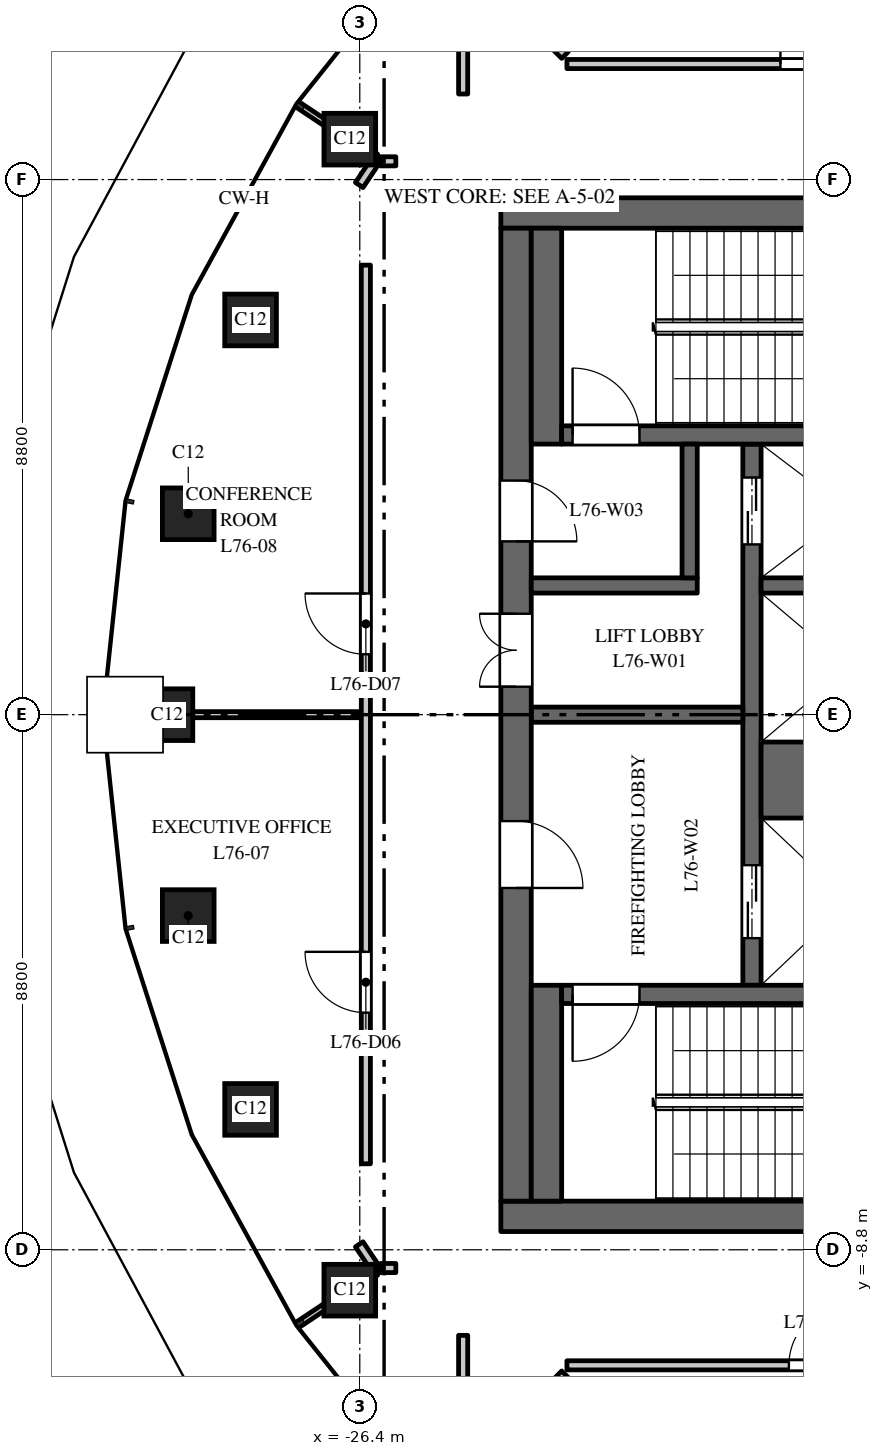
"""IFC4 building model, lengths in metres.
Left out: names, types, materials, properties, quantities, classifications, styles, units other than length and angle.
Written with IfcOpenShell. Run it as: python <this file> out.ifc"""

import sys

from ifc_helpers import new_model, si_unit, direction, frame, frame_2d, origin, origin_2d, place, context, subcontext, project, spatial, rectangle, extrude, element, fill, save


model = new_model("IFC4")
c1 = context("Model", 3, precision=1e-05, world=origin(), true_north=direction((0.0, 1.0)))
c2 = subcontext(c1, "Body", "Model", "MODEL_VIEW")
j1 = project(units=[si_unit("LENGTHUNIT", "METRE"), si_unit("PLANEANGLEUNIT", "RADIAN")], contexts=[c1])
p1 = place(None, origin())
s1 = spatial("IfcSite", under=j1, at=p1, CompositionType="ELEMENT")
p2 = place(p1, origin())
s2 = spatial("IfcBuilding", under=s1, at=p2, CompositionType="ELEMENT")
p3 = place(p2, frame((0.0, 0.0, 347.0)))
s3 = spatial("IfcBuildingStorey", under=s2, at=p3, CompositionType="ELEMENT", Elevation=347.0)
p4 = place(p3, frame((-24.418, 12.154, 0.021), z_axis=(0.450739713419, -0.316171343674, 0.834787034031), x_axis=(0.574258734761, 0.81867387008, 0.0)))
e1 = element("IfcColumn", 1, at=p4, inside=s3, PredefinedType="COLUMN", context=c2, shape_type="SweptSolid", body=[
    extrude(rectangle(XDim=0.85, YDim=0.85, at=origin_2d()), origin(), (0.0, 0.0, 1.0), 4.744),
])
p5 = place(p3, frame((-26.564, 9.464, 0.021), z_axis=(0.491879634407, -0.247568905736, 0.834723943689), x_axis=(0.449578736033, 0.893240706701, 0.0)))
e2 = element("IfcColumn", 2, at=p5, inside=s3, PredefinedType="COLUMN", context=c2, shape_type="SweptSolid", body=[
    extrude(rectangle(XDim=0.85, YDim=0.85, at=origin_2d()), origin(), (0.0, 0.0, 1.0), 4.646),
])
p6 = place(p3, frame((-28.196, 6.491, 0.021), z_axis=(0.523716020233, -0.170699160403, 0.834615676098), x_axis=(0.309892926909, 0.950771462472, 0.0)))
e3 = element("IfcColumn", 3, at=p6, inside=s3, PredefinedType="COLUMN", context=c2, shape_type="SweptSolid", body=[
    extrude(rectangle(XDim=0.85, YDim=0.85, at=origin_2d()), origin(), (0.0, 0.0, 1.0), 4.707),
])
p7 = place(p3, frame((-29.221, 3.304, 0.021), z_axis=(0.544037398936, -0.087235716357, 0.834513773614), x_axis=(0.158326246878, 0.987386854049, 0.0)))
e4 = element("IfcColumn", 4, at=p7, inside=s3, PredefinedType="COLUMN", context=c2, shape_type="SweptSolid", body=[
    extrude(rectangle(XDim=0.85, YDim=0.85, at=origin_2d()), origin(), (0.0, 0.0, 1.0), 4.735),
])
p8 = place(p3, frame((-29.572, 0.0, 0.021), z_axis=(0.551078466919, 0.0, 0.834453427878), x_axis=(0.0, 1.0, 0.0)))
e5 = element("IfcColumn", 5, at=p8, inside=s3, PredefinedType="COLUMN", context=c2, shape_type="SweptSolid", body=[
    extrude(rectangle(XDim=0.85, YDim=0.85, at=origin_2d()), origin(), (0.0, 0.0, 1.0), 4.736),
])
p9 = place(p3, frame((-29.221, -3.304, 0.021), z_axis=(0.544037398936, 0.087235716357, 0.834513773614), x_axis=(-0.158326246878, 0.987386854049, 0.0)))
e6 = element("IfcColumn", 6, at=p9, inside=s3, PredefinedType="COLUMN", context=c2, shape_type="SweptSolid", body=[
    extrude(rectangle(XDim=0.85, YDim=0.85, at=origin_2d()), origin(), (0.0, 0.0, 1.0), 4.735),
])
p10 = place(p3, frame((-28.196, -6.491, 0.021), z_axis=(0.523716020233, 0.170699160403, 0.834615676098), x_axis=(-0.309892926909, 0.950771462472, 0.0)))
e7 = element("IfcColumn", 7, at=p10, inside=s3, PredefinedType="COLUMN", context=c2, shape_type="SweptSolid", body=[
    extrude(rectangle(XDim=0.85, YDim=0.85, at=origin_2d()), origin(), (0.0, 0.0, 1.0), 4.707),
])
p11 = place(p3, frame((-26.564, -9.464, 0.021), z_axis=(0.491879634407, 0.247568905736, 0.834723943689), x_axis=(-0.449578736033, 0.893240706701, 0.0)))
e8 = element("IfcColumn", 8, at=p11, inside=s3, PredefinedType="COLUMN", context=c2, shape_type="SweptSolid", body=[
    extrude(rectangle(XDim=0.85, YDim=0.85, at=origin_2d()), origin(), (0.0, 0.0, 1.0), 4.646),
])
p12 = place(p3, frame((-24.418, -12.154, 0.021), z_axis=(0.450739713419, 0.316171343674, 0.834787034031), x_axis=(-0.574258734761, 0.81867387008, 0.0)))
e9 = element("IfcColumn", 9, at=p12, inside=s3, PredefinedType="COLUMN", context=c2, shape_type="SweptSolid", body=[
    extrude(rectangle(XDim=0.85, YDim=0.85, at=origin_2d()), origin(), (0.0, 0.0, 1.0), 4.744),
])
for number, where, z_axis, x_axis in (
    (10, (-16.5, 8.25, 0.0), (0.0, 0.0, 1.0), (-1.0, 0.0, 0.0)),
    (11, (-16.5, -8.25, 0.0), (0.0, 0.0, 1.0), (-1.0, 0.0, 0.0)),
):
    element("IfcWall", number, at=place(p3, frame(where, z_axis=z_axis, x_axis=x_axis)), inside=s3, PredefinedType="SHEAR", context=c2, shape_type="SweptSolid", body=[
        extrude(rectangle(XDim=7.58, YDim=0.5, at=frame_2d((3.79, 0.0))), origin(), (0.0, 0.0, 1.0), 3.7),
    ])
p13 = place(p3, frame((-19.95, -4.45, 0.0), z_axis=(0.0, 0.0, 1.0), x_axis=(0.0, 1.0, 0.0)))
e12 = element("IfcWall", 12, at=p13, inside=s3, PredefinedType="SHEAR", context=c2, shape_type="SweptSolid", body=[
    extrude(rectangle(XDim=8.9, YDim=0.3, at=frame_2d((4.45, 0.0))), origin(), (0.0, 0.0, 1.0), 3.7),
])
p14 = place(p13, frame((0.775, 0.0, 0.0)))
e13 = element("IfcOpeningElement", 13, at=p14, cuts=e12, PredefinedType="OPENING", context=c2, shape_type="SweptSolid", body=[
    extrude(rectangle(XDim=1.2, YDim=2.1, at=frame_2d((0.6, 1.05))), frame((0.0, 0.16, 0.0), z_axis=(0.0, -1.0, 0.0), x_axis=(1.0, 0.0, 0.0)), (0.0, 0.0, 1.0), 0.32),
])
p15 = place(p13, frame((7.25, 0.0, 0.0)))
e14 = element("IfcOpeningElement", 14, at=p15, cuts=e12, PredefinedType="OPENING", context=c2, shape_type="SweptSolid", body=[
    extrude(rectangle(XDim=1.1, YDim=2.1, at=frame_2d((0.55, 1.05))), frame((0.0, 0.16, 0.0), z_axis=(0.0, -1.0, 0.0), x_axis=(1.0, 0.0, 0.0)), (0.0, 0.0, 1.0), 0.32),
])
p16 = place(p3, frame((-20.1, 0.0, 0.0), z_axis=(0.0, 0.0, 1.0), x_axis=(-1.0, 0.0, 0.0)))
e15 = element("IfcWall", 15, at=p16, inside=s3, PredefinedType="SHEAR", context=c2, shape_type="SweptSolid", body=[
    extrude(rectangle(XDim=3.48, YDim=0.25, at=frame_2d((1.74, 0.0))), origin(), (0.0, 0.0, 1.0), 3.7),
])
p17 = place(p3, frame((-23.83, -8.0, 0.0), z_axis=(0.0, 0.0, 1.0), x_axis=(0.0, 1.0, 0.0)))
e16 = element("IfcWall", 16, at=p17, inside=s3, PredefinedType="SHEAR", context=c2, shape_type="SweptSolid", body=[
    extrude(rectangle(XDim=16.0, YDim=0.5, at=frame_2d((8.0, 0.0))), origin(), (0.0, 0.0, 1.0), 3.7),
])
p18 = place(p17, frame((5.15, 0.0, 0.0)))
e17 = element("IfcOpeningElement", 17, at=p18, cuts=e16, PredefinedType="OPENING", context=c2, shape_type="SweptSolid", body=[
    extrude(rectangle(XDim=1.1, YDim=2.1, at=frame_2d((0.55, 1.05))), frame((0.0, 0.26, 0.0), z_axis=(0.0, -1.0, 0.0), x_axis=(1.0, 0.0, 0.0)), (0.0, 0.0, 1.0), 0.52),
])
p19 = place(p17, frame((10.85, 0.0, 0.0)))
e18 = element("IfcOpeningElement", 18, at=p19, cuts=e16, PredefinedType="OPENING", context=c2, shape_type="SweptSolid", body=[
    extrude(rectangle(XDim=1.0, YDim=2.1, at=frame_2d((0.5, 1.05))), frame((0.0, 0.26, 0.0), z_axis=(0.0, -1.0, 0.0), x_axis=(1.0, 0.0, 0.0)), (0.0, 0.0, 1.0), 0.52),
])
p20 = place(p17, frame((8.46, 0.0, 0.0)))
e19 = element("IfcOpeningElement", 19, at=p20, cuts=e16, PredefinedType="OPENING", context=c2, shape_type="SweptSolid", body=[
    extrude(rectangle(XDim=1.2, YDim=2.1, at=frame_2d((0.6, 1.05))), frame((0.0, 0.26, 0.0), z_axis=(0.0, -1.0, 0.0), x_axis=(1.0, 0.0, 0.0)), (0.0, 0.0, 1.0), 0.52),
])
p21 = place(p3, frame((-16.9, -1.075, 0.0), z_axis=(0.0, 0.0, 1.0), x_axis=(-1.0, 0.0, 0.0)))
e20 = element("IfcWall", 20, at=p21, inside=s3, PredefinedType="SHEAR", context=c2, shape_type="SweptSolid", body=[
    extrude(rectangle(XDim=2.9, YDim=1.25, at=frame_2d((1.45, 0.0))), origin(), (0.0, 0.0, 1.0), 3.7),
])
p22 = place(p3, frame((-16.9, 2.125, 0.0), z_axis=(0.0, 0.0, 1.0), x_axis=(-1.0, 0.0, 0.0)))
e21 = element("IfcWall", 21, at=p22, inside=s3, PredefinedType="SHEAR", context=c2, shape_type="SweptSolid", body=[
    extrude(rectangle(XDim=2.9, YDim=0.25, at=frame_2d((1.45, 0.0))), origin(), (0.0, 0.0, 1.0), 3.7),
])
for number, where, z_axis, x_axis in (
    (22, (-23.33, 4.45, 0.0), (0.0, 0.0, 1.0), (0.0, 1.0, 0.0)),
    (23, (-23.33, -8.0, 0.0), (0.0, 0.0, 1.0), (0.0, 1.0, 0.0)),
):
    element("IfcWall", number, at=place(p3, frame(where, z_axis=z_axis, x_axis=x_axis)), inside=s3, PredefinedType="SHEAR", context=c2, shape_type="SweptSolid", body=[
        extrude(rectangle(XDim=3.55, YDim=0.5, at=frame_2d((1.775, 0.0))), origin(), (0.0, 0.0, 1.0), 3.7),
    ])
p23 = place(p3, frame((-16.9, 4.6, 0.0), z_axis=(0.0, 0.0, 1.0), x_axis=(-1.0, 0.0, 0.0)))
e24 = element("IfcWall", 24, at=p23, inside=s3, PredefinedType="SHEAR", context=c2, shape_type="SweptSolid", body=[
    extrude(rectangle(XDim=6.18, YDim=0.3, at=frame_2d((3.09, 0.0))), origin(), (0.0, 0.0, 1.0), 3.7),
])
p24 = place(p23, frame((4.9, 0.0, 0.0)))
e25 = element("IfcOpeningElement", 25, at=p24, cuts=e24, PredefinedType="OPENING", context=c2, shape_type="SweptSolid", body=[
    extrude(rectangle(XDim=1.1, YDim=2.1, at=frame_2d((0.55, 1.05))), frame((0.0, 0.16, 0.0), z_axis=(0.0, -1.0, 0.0), x_axis=(1.0, 0.0, 0.0)), (0.0, 0.0, 1.0), 0.32),
])
p25 = place(p3, frame((-16.9, -4.6, 0.0), z_axis=(0.0, 0.0, 1.0), x_axis=(-1.0, 0.0, 0.0)))
e26 = element("IfcWall", 26, at=p25, inside=s3, PredefinedType="SHEAR", context=c2, shape_type="SweptSolid", body=[
    extrude(rectangle(XDim=6.18, YDim=0.3, at=frame_2d((3.09, 0.0))), origin(), (0.0, 0.0, 1.0), 3.7),
])
p26 = place(p25, frame((4.9, 0.0, 0.0)))
e27 = element("IfcOpeningElement", 27, at=p26, cuts=e26, PredefinedType="OPENING", context=c2, shape_type="SweptSolid", body=[
    extrude(rectangle(XDim=1.1, YDim=2.1, at=frame_2d((0.55, 1.05))), frame((0.0, 0.16, 0.0), z_axis=(0.0, -1.0, 0.0), x_axis=(1.0, 0.0, 0.0)), (0.0, 0.0, 1.0), 0.32),
])
p27 = place(p3, frame((-20.85, 2.125, 0.0), z_axis=(0.0, 0.0, 1.0), x_axis=(-1.0, 0.0, 0.0)))
e28 = element("IfcWall", 28, at=p27, inside=s3, PredefinedType="SHEAR", context=c2, shape_type="SweptSolid", body=[
    extrude(rectangle(XDim=2.73, YDim=0.25, at=frame_2d((1.365, 0.0))), origin(), (0.0, 0.0, 1.0), 3.7),
])
p28 = place(p3, frame((-20.975, 2.25, 0.0), z_axis=(0.0, 0.0, 1.0), x_axis=(0.0, 1.0, 0.0)))
e29 = element("IfcWall", 29, at=p28, inside=s3, PredefinedType="SHEAR", context=c2, shape_type="SweptSolid", body=[
    extrude(rectangle(XDim=2.2, YDim=0.25, at=frame_2d((1.1, 0.0))), origin(), (0.0, 0.0, 1.0), 3.7),
])
p29 = place(p3, frame((-30.59, 0.0, 0.0), z_axis=(0.0, 0.0, 1.0), x_axis=(1.0, 0.0, 0.0)))
e30 = element("IfcWall", 30, at=p29, inside=s3, PredefinedType="PARTITIONING", context=c2, shape_type="SweptSolid", body=[
    extrude(rectangle(XDim=4.215, YDim=0.1, at=frame_2d((2.107, 0.0))), origin(), (0.0, 0.0, 1.0), 3.0),
])
for number, where, z_axis, x_axis in (
    (31, (-27.412, -10.027, 0.0), (0.0, 0.0, 1.0), (0.832, 0.554, 0.0)),
    (32, (-27.412, 10.027, 0.0), (0.0, 0.0, 1.0), (0.832, -0.554, 0.0)),
):
    element("IfcWall", number, at=place(p3, frame(where, z_axis=z_axis, x_axis=x_axis)), inside=s3, PredefinedType="PARTITIONING", context=c2, shape_type="SweptSolid", body=[
        extrude(rectangle(XDim=1.537, YDim=0.1, at=frame_2d((0.769, 0.0))), origin(), (0.0, 0.0, 1.0), 3.7),
    ])
for number, where, z_axis, x_axis in (
    (33, (-26.409, -8.71, 0.0), (0.0, 0.0, 1.0), (0.556, -0.831, 0.0)),
    (34, (-26.409, 8.71, 0.0), (0.0, 0.0, 1.0), (0.556, 0.831, 0.0)),
):
    element("IfcWall", number, at=place(p3, frame(where, z_axis=z_axis, x_axis=x_axis)), inside=s3, PredefinedType="PARTITIONING", context=c2, shape_type="SweptSolid", body=[
        extrude(rectangle(XDim=0.56, YDim=0.15, at=frame_2d((0.28, 0.0))), origin(), (0.0, 0.0, 1.0), 3.7),
    ])
p30 = place(p3, frame((-26.3, -7.386, 0.0), z_axis=(0.0, 0.0, 1.0), x_axis=(0.0, 1.0, 0.0)))
e35 = element("IfcWall", 35, at=p30, inside=s3, PredefinedType="PARTITIONING", context=c2, shape_type="SweptSolid", body=[
    extrude(rectangle(XDim=14.779, YDim=0.15, at=frame_2d((7.39, 0.0))), origin(), (0.0, 0.0, 1.0), 3.0),
])
p31 = place(p30, frame((2.486, 0.0, 0.0)))
e36 = element("IfcOpeningElement", 36, at=p31, cuts=e35, PredefinedType="OPENING", context=c2, shape_type="SweptSolid", body=[
    extrude(rectangle(XDim=1.0, YDim=2.1, at=frame_2d((0.5, 1.05))), frame((0.0, 0.085, 0.0), z_axis=(0.0, -1.0, 0.0), x_axis=(1.0, 0.0, 0.0)), (0.0, 0.0, 1.0), 0.17),
])
p32 = place(p30, frame((8.379, 0.0, 0.0)))
e37 = element("IfcOpeningElement", 37, at=p32, cuts=e35, PredefinedType="OPENING", context=c2, shape_type="SweptSolid", body=[
    extrude(rectangle(XDim=1.0, YDim=2.1, at=frame_2d((0.5, 1.05))), frame((0.0, 0.085, 0.0), z_axis=(0.0, -1.0, 0.0), x_axis=(1.0, 0.0, 0.0)), (0.0, 0.0, 1.0), 0.17),
])
for number, where, z_axis, x_axis in (
    (38, (-26.058, -9.1, 0.0), (0.0, 0.0, 1.0), (1.0, 0.0, 0.0)),
    (39, (-26.058, 9.1, 0.0), (0.0, 0.0, 1.0), (1.0, 0.0, 0.0)),
):
    element("IfcWall", number, at=place(p3, frame(where, z_axis=z_axis, x_axis=x_axis)), inside=s3, PredefinedType="PARTITIONING", context=c2, shape_type="SweptSolid", body=[
        extrude(rectangle(XDim=0.251, YDim=0.15, at=frame_2d((0.125, 0.0))), origin(), (0.0, 0.0, 1.0), 3.7),
    ])
for number, where, z_axis, x_axis in (
    (40, (-24.7, -11.636, 0.0), (0.0, 0.0, 1.0), (0.0, 1.0, 0.0)),
    (41, (-24.7, 10.207, 0.0), (0.0, 0.0, 1.0), (0.0, 1.0, 0.0)),
):
    element("IfcWall", number, at=place(p3, frame(where, z_axis=z_axis, x_axis=x_axis)), inside=s3, PredefinedType="PARTITIONING", context=c2, shape_type="SweptSolid", body=[
        extrude(rectangle(XDim=1.429, YDim=0.15, at=frame_2d((0.714, 0.0))), origin(), (0.0, 0.0, 1.0), 3.7),
    ])
p33 = place(p3, frame((-22.993, -10.7, 0.0), z_axis=(0.0, 0.0, 1.0), x_axis=(1.0, 0.0, 0.0)))
e42 = element("IfcWall", 42, at=p33, inside=s3, PredefinedType="PARTITIONING", context=c2, shape_type="SweptSolid", body=[
    extrude(rectangle(XDim=5.292, YDim=0.15, at=frame_2d((2.646, 0.0))), origin(), (0.0, 0.0, 1.0), 3.0),
])
p34 = place(p33, frame((3.65, 0.0, 0.0)))
e43 = element("IfcOpeningElement", 43, at=p34, cuts=e42, PredefinedType="OPENING", context=c2, shape_type="SweptSolid", body=[
    extrude(rectangle(XDim=1.0, YDim=2.1, at=frame_2d((0.5, 1.05))), frame((0.0, 0.085, 0.0), z_axis=(0.0, -1.0, 0.0), x_axis=(1.0, 0.0, 0.0)), (0.0, 0.0, 1.0), 0.17),
])
p35 = place(p3, frame((-22.993, 10.7, 0.0), z_axis=(0.0, 0.0, 1.0), x_axis=(1.0, 0.0, 0.0)))
e44 = element("IfcWall", 44, at=p35, inside=s3, PredefinedType="PARTITIONING", context=c2, shape_type="SweptSolid", body=[
    extrude(rectangle(XDim=5.292, YDim=0.15, at=frame_2d((2.646, 0.0))), origin(), (0.0, 0.0, 1.0), 3.0),
])
p36 = place(p35, frame((3.511, 0.0, 0.0)))
e45 = element("IfcOpeningElement", 45, at=p36, cuts=e44, PredefinedType="OPENING", context=c2, shape_type="SweptSolid", body=[
    extrude(rectangle(XDim=1.0, YDim=2.1, at=frame_2d((0.5, 1.05))), frame((0.0, 0.085, 0.0), z_axis=(0.0, -1.0, 0.0), x_axis=(1.0, 0.0, 0.0)), (0.0, 0.0, 1.0), 0.17),
])
for number, where, z_axis, x_axis in (
    (46, (-23.026, -10.846, 0.0), (0.0, 0.0, 1.0), (-0.706, -0.709, 0.0)),
    (47, (-23.458, 11.28, 0.0), (0.0, 0.0, 1.0), (0.706, -0.709, 0.0)),
):
    element("IfcWall", number, at=place(p3, frame(where, z_axis=z_axis, x_axis=x_axis)), inside=s3, PredefinedType="PARTITIONING", context=c2, shape_type="SweptSolid", body=[
        extrude(rectangle(XDim=0.613, YDim=0.15, at=frame_2d((0.306, 0.0))), origin(), (0.0, 0.0, 1.0), 3.7),
    ])
p37 = place(p14, origin())
e48 = element("IfcDoor", 48, at=p37, inside=s3, OperationType="DOUBLE_DOOR_SLIDING", PredefinedType="DOOR", context=c2, shape_type="SweptSolid", body=[
    extrude(rectangle(XDim=1.2, YDim=2.1, at=frame_2d((0.6, 1.05))), frame((0.0, 0.025, 0.0), z_axis=(0.0, -1.0, 0.0), x_axis=(1.0, 0.0, 0.0)), (0.0, 0.0, 1.0), 0.05),
])
fill(e13, e48)
p38 = place(p15, origin())
e49 = element("IfcDoor", 49, at=p38, inside=s3, OperationType="DOUBLE_DOOR_SLIDING", PredefinedType="DOOR", context=c2, shape_type="SweptSolid", body=[
    extrude(rectangle(XDim=1.1, YDim=2.1, at=frame_2d((0.55, 1.05))), frame((0.0, 0.025, 0.0), z_axis=(0.0, -1.0, 0.0), x_axis=(1.0, 0.0, 0.0)), (0.0, 0.0, 1.0), 0.05),
])
fill(e14, e49)
p39 = place(p24, origin())
e50 = element("IfcDoor", 50, at=p39, inside=s3, OperationType="SINGLE_SWING_RIGHT", PredefinedType="DOOR", context=c2, shape_type="SweptSolid", body=[
    extrude(rectangle(XDim=1.1, YDim=2.1, at=frame_2d((0.55, 1.05))), frame((0.0, 0.025, 0.0), z_axis=(0.0, -1.0, 0.0), x_axis=(1.0, 0.0, 0.0)), (0.0, 0.0, 1.0), 0.05),
])
fill(e25, e50)
p40 = place(p26, origin())
e51 = element("IfcDoor", 51, at=p40, inside=s3, OperationType="SINGLE_SWING_LEFT", PredefinedType="DOOR", context=c2, shape_type="SweptSolid", body=[
    extrude(rectangle(XDim=1.1, YDim=2.1, at=frame_2d((0.55, 1.05))), frame((0.0, 0.025, 0.0), z_axis=(0.0, -1.0, 0.0), x_axis=(1.0, 0.0, 0.0)), (0.0, 0.0, 1.0), 0.05),
])
fill(e27, e51)
p41 = place(p18, origin())
e52 = element("IfcDoor", 52, at=p41, inside=s3, OperationType="SINGLE_SWING_LEFT", PredefinedType="DOOR", context=c2, shape_type="SweptSolid", body=[
    extrude(rectangle(XDim=1.1, YDim=2.1, at=frame_2d((0.55, 1.05))), frame((0.0, 0.025, 0.0), z_axis=(0.0, -1.0, 0.0), x_axis=(1.0, 0.0, 0.0)), (0.0, 0.0, 1.0), 0.05),
])
fill(e17, e52)
p42 = place(p19, origin())
e53 = element("IfcDoor", 53, at=p42, inside=s3, OperationType="SINGLE_SWING_LEFT", PredefinedType="DOOR", context=c2, shape_type="SweptSolid", body=[
    extrude(rectangle(XDim=1.0, YDim=2.1, at=frame_2d((0.5, 1.05))), frame((0.0, 0.025, 0.0), z_axis=(0.0, -1.0, 0.0), x_axis=(1.0, 0.0, 0.0)), (0.0, 0.0, 1.0), 0.05),
])
fill(e18, e53)
p43 = place(p20, origin())
e54 = element("IfcDoor", 54, at=p43, inside=s3, OperationType="DOUBLE_DOOR_DOUBLE_SWING", PredefinedType="DOOR", context=c2, shape_type="SweptSolid", body=[
    extrude(rectangle(XDim=1.2, YDim=2.1, at=frame_2d((0.6, 1.05))), frame((0.0, 0.025, 0.0), z_axis=(0.0, -1.0, 0.0), x_axis=(1.0, 0.0, 0.0)), (0.0, 0.0, 1.0), 0.05),
])
fill(e19, e54)
p44 = place(p31, origin())
e55 = element("IfcDoor", 55, at=p44, inside=s3, OperationType="SINGLE_SWING_RIGHT", PredefinedType="DOOR", context=c2, shape_type="SweptSolid", body=[
    extrude(rectangle(XDim=1.0, YDim=2.1, at=frame_2d((0.5, 1.05))), frame((0.0, 0.025, 0.0), z_axis=(0.0, -1.0, 0.0), x_axis=(1.0, 0.0, 0.0)), (0.0, 0.0, 1.0), 0.05),
])
fill(e36, e55)
p45 = place(p32, origin())
e56 = element("IfcDoor", 56, at=p45, inside=s3, OperationType="SINGLE_SWING_RIGHT", PredefinedType="DOOR", context=c2, shape_type="SweptSolid", body=[
    extrude(rectangle(XDim=1.0, YDim=2.1, at=frame_2d((0.5, 1.05))), frame((0.0, 0.025, 0.0), z_axis=(0.0, -1.0, 0.0), x_axis=(1.0, 0.0, 0.0)), (0.0, 0.0, 1.0), 0.05),
])
fill(e37, e56)
p46 = place(p34, origin())
e57 = element("IfcDoor", 57, at=p46, inside=s3, OperationType="SINGLE_SWING_RIGHT", PredefinedType="DOOR", context=c2, shape_type="SweptSolid", body=[
    extrude(rectangle(XDim=1.0, YDim=2.1, at=frame_2d((0.5, 1.05))), frame((0.0, 0.025, 0.0), z_axis=(0.0, -1.0, 0.0), x_axis=(1.0, 0.0, 0.0)), (0.0, 0.0, 1.0), 0.05),
])
fill(e43, e57)
p47 = place(p36, origin())
e58 = element("IfcDoor", 58, at=p47, inside=s3, OperationType="SINGLE_SWING_LEFT", PredefinedType="DOOR", context=c2, shape_type="SweptSolid", body=[
    extrude(rectangle(XDim=1.0, YDim=2.1, at=frame_2d((0.5, 1.05))), frame((0.0, 0.025, 0.0), z_axis=(0.0, -1.0, 0.0), x_axis=(1.0, 0.0, 0.0)), (0.0, 0.0, 1.0), 0.05),
])
fill(e45, e58)
save(model, sys.argv[1])
